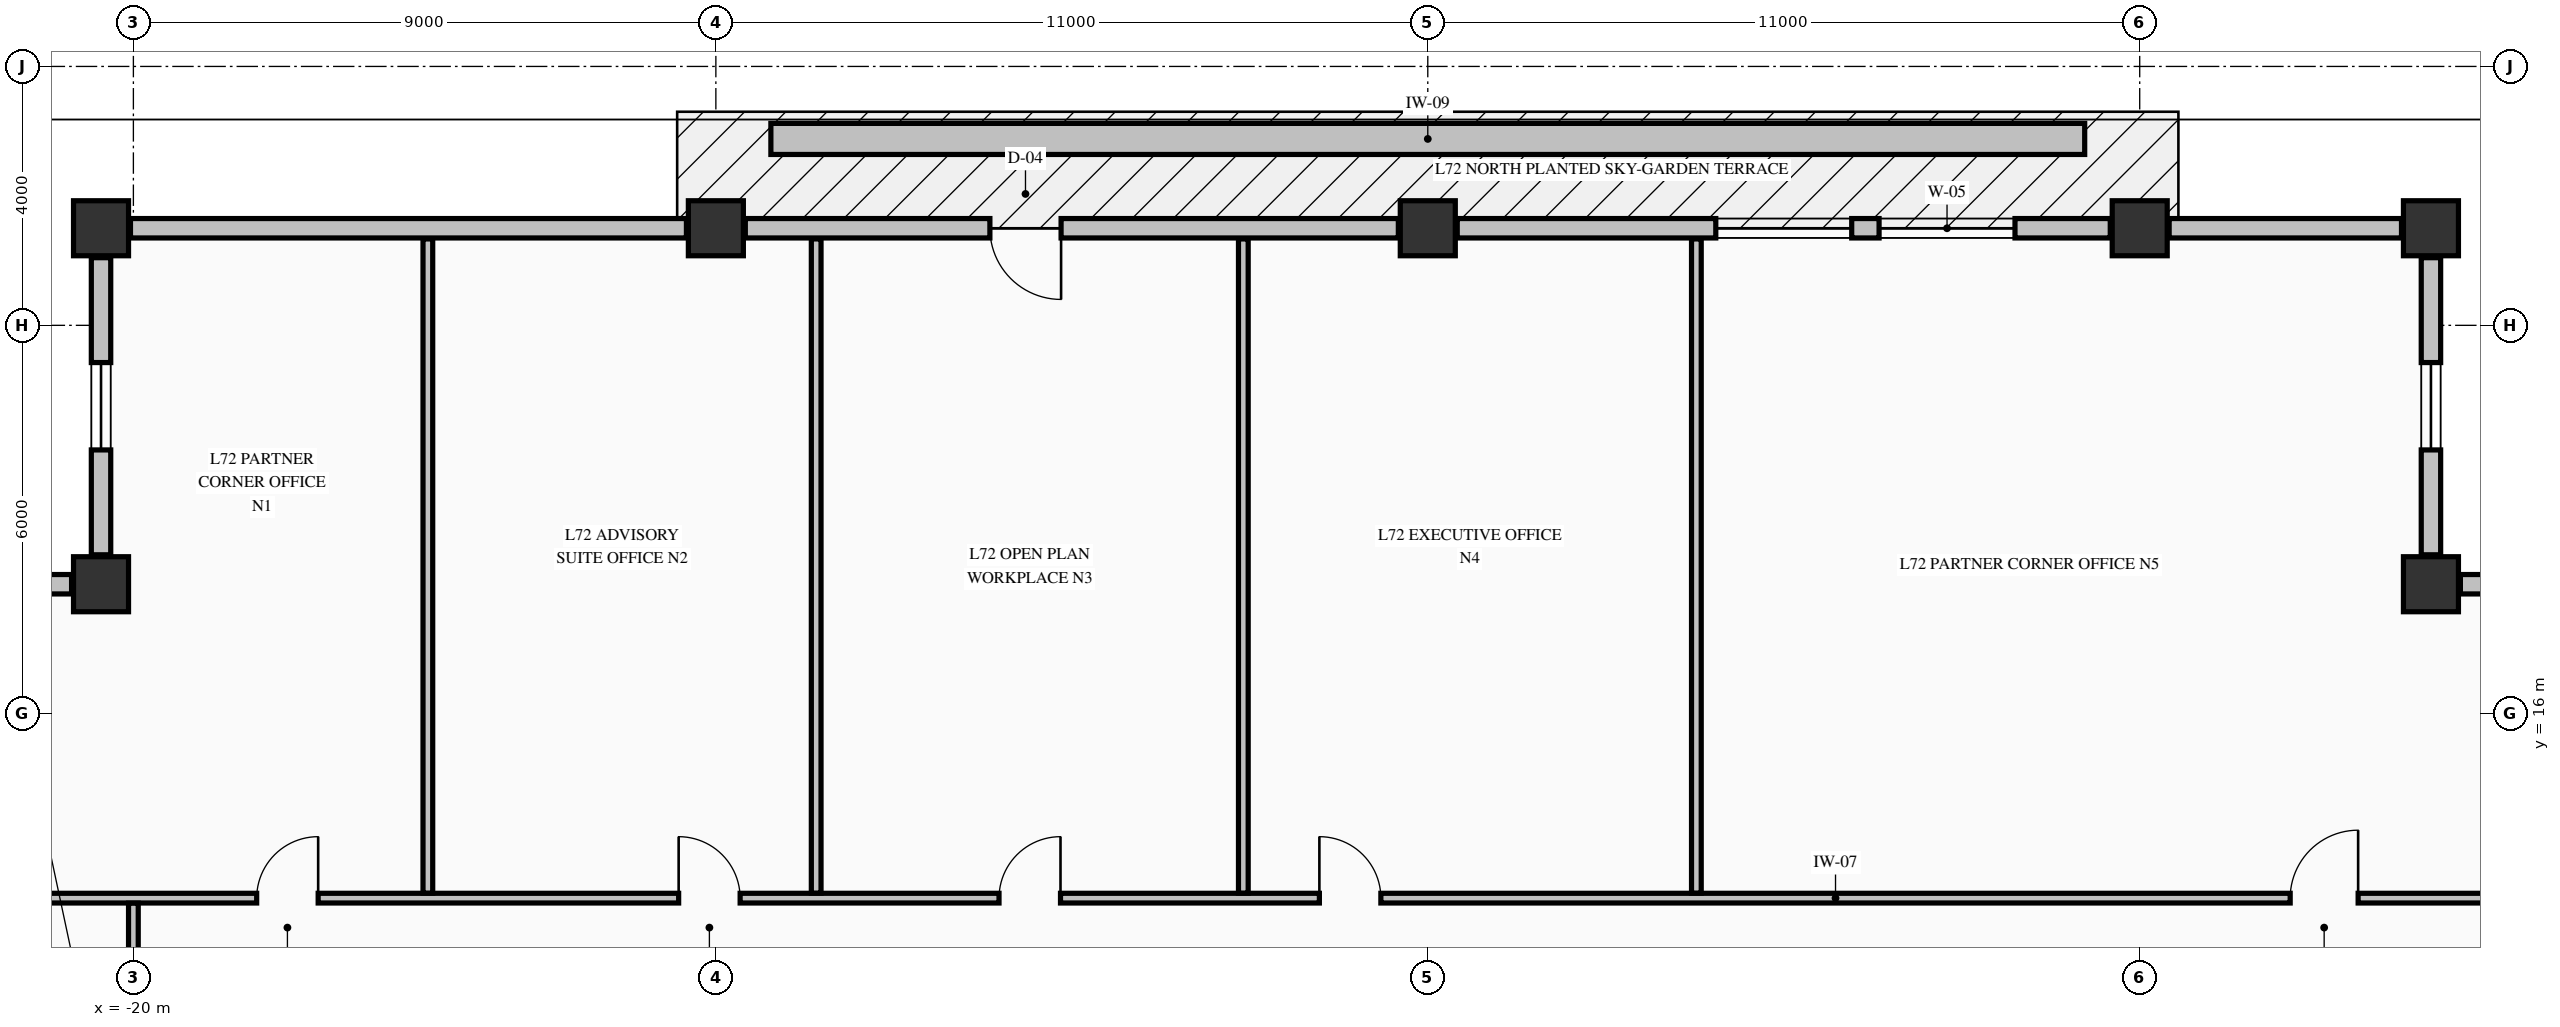
"""IFC4 building model, lengths in metres.
Left out: names, types, materials, properties, quantities, classifications, styles, units other than length and angle.
Written with IfcOpenShell. Run it as: python <this file> out.ifc"""

import sys

from ifc_helpers import new_model, si_unit, direction, frame, frame_2d, origin, origin_2d, place, context, subcontext, project, spatial, rectangle, extrude, element, fill, save


model = new_model("IFC4")
c1 = context("Model", 3, precision=1e-05, world=origin(), true_north=direction((0.0, 1.0)))
c2 = subcontext(c1, "Body", "Model", "MODEL_VIEW")
j1 = project(units=[si_unit("LENGTHUNIT", "METRE"), si_unit("PLANEANGLEUNIT", "RADIAN")], contexts=[c1])
p1 = place(None, origin())
s1 = spatial("IfcSite", under=j1, at=p1, CompositionType="ELEMENT")
p2 = place(p1, origin())
s2 = spatial("IfcBuilding", under=s1, at=p2, CompositionType="ELEMENT")
p3 = place(p2, frame((0.0, 0.0, 270.58)))
s3 = spatial("IfcBuildingStorey", under=s2, at=p3, CompositionType="ELEMENT", Elevation=270.58)
for number, where, z_axis, x_axis in (
    (1, (-20.5, 23.5, -0.325), (0.0, 0.0, 1.0), (1.0, 0.0, 0.0)),
    (2, (-11.0, 23.5, -0.325), (0.0, 0.0, 1.0), (1.0, 0.0, 0.0)),
    (3, (0.0, 23.5, -0.325), (0.0, 0.0, 1.0), (1.0, 0.0, 0.0)),
    (4, (11.0, 23.5, -0.325), (0.0, 0.0, 1.0), (1.0, 0.0, 0.0)),
    (5, (15.5, 23.5, -0.325), (0.0, 0.0, 1.0), (1.0, 0.0, 0.0)),
    (6, (15.5, 18.0, -0.325), (0.0, 0.0, 1.0), (1.0, 0.0, 0.0)),
    (7, (-20.5, 18.0, -0.325), (0.0, 0.0, 1.0), (1.0, 0.0, 0.0)),
):
    element("IfcColumn", number, at=place(p3, frame(where, z_axis=z_axis, x_axis=x_axis)), inside=s3, PredefinedType="COLUMN", context=c2, shape_type="SweptSolid", body=[
        extrude(rectangle(XDim=0.85, YDim=0.85, at=origin_2d()), origin(), (0.0, 0.0, 1.0), 3.815),
    ])
p4 = place(p3, frame((20.545, 18.0, 0.0), z_axis=(0.0, 0.0, 1.0), x_axis=(-1.0, 0.0, 0.0)))
e8 = element("IfcWall", 8, at=p4, inside=s3, PredefinedType="STANDARD", context=c2, shape_type="SweptSolid", body=[
    extrude(rectangle(XDim=4.59, YDim=0.3, at=frame_2d((2.295, 0.0))), origin(), (0.0, 0.0, 1.0), 2.882),
])
p5 = place(p4, frame((1.62, 0.0, 0.68)))
e9 = element("IfcOpeningElement", 9, at=p5, cuts=e8, PredefinedType="OPENING", context=c2, shape_type="SweptSolid", body=[
    extrude(rectangle(XDim=1.35, YDim=1.42, at=frame_2d((0.675, 0.71))), frame((0.0, 0.16, 0.0), z_axis=(0.0, -1.0, 0.0), x_axis=(1.0, 0.0, 0.0)), (0.0, 0.0, 1.0), 0.32),
])
p6 = place(p3, frame((15.5, 18.455, 0.0), z_axis=(0.0, 0.0, 1.0), x_axis=(0.0, 1.0, 0.0)))
e10 = element("IfcWall", 10, at=p6, inside=s3, PredefinedType="STANDARD", context=c2, shape_type="SweptSolid", body=[
    extrude(rectangle(XDim=4.59, YDim=0.3, at=frame_2d((2.295, 0.0))), origin(), (0.0, 0.0, 1.0), 2.882),
])
p7 = place(p6, frame((1.62, 0.0, 0.68)))
e11 = element("IfcOpeningElement", 11, at=p7, cuts=e10, PredefinedType="OPENING", context=c2, shape_type="SweptSolid", body=[
    extrude(rectangle(XDim=1.35, YDim=1.42, at=frame_2d((0.675, 0.71))), frame((0.0, 0.16, 0.0), z_axis=(0.0, -1.0, 0.0), x_axis=(1.0, 0.0, 0.0)), (0.0, 0.0, 1.0), 0.32),
])
p8 = place(p3, frame((-20.5, 23.045, 0.0), z_axis=(0.0, 0.0, 1.0), x_axis=(0.0, -1.0, 0.0)))
e12 = element("IfcWall", 12, at=p8, inside=s3, PredefinedType="STANDARD", context=c2, shape_type="SweptSolid", body=[
    extrude(rectangle(XDim=4.59, YDim=0.3, at=frame_2d((2.295, 0.0))), origin(), (0.0, 0.0, 1.0), 2.882),
])
p9 = place(p8, frame((1.62, 0.0, 0.68)))
e13 = element("IfcOpeningElement", 13, at=p9, cuts=e12, PredefinedType="OPENING", context=c2, shape_type="SweptSolid", body=[
    extrude(rectangle(XDim=1.35, YDim=1.42, at=frame_2d((0.675, 0.71))), frame((0.0, 0.16, 0.0), z_axis=(0.0, -1.0, 0.0), x_axis=(1.0, 0.0, 0.0)), (0.0, 0.0, 1.0), 0.32),
])
p10 = place(p3, frame((-20.955, 18.0, 0.0), z_axis=(0.0, 0.0, 1.0), x_axis=(-1.0, 0.0, 0.0)))
e14 = element("IfcWall", 14, at=p10, inside=s3, PredefinedType="STANDARD", context=c2, shape_type="SweptSolid", body=[
    extrude(rectangle(XDim=4.59, YDim=0.3, at=frame_2d((2.295, 0.0))), origin(), (0.0, 0.0, 1.0), 2.882),
])
p11 = place(p10, frame((1.62, 0.0, 0.68)))
e15 = element("IfcOpeningElement", 15, at=p11, cuts=e14, PredefinedType="OPENING", context=c2, shape_type="SweptSolid", body=[
    extrude(rectangle(XDim=1.35, YDim=1.42, at=frame_2d((0.675, 0.71))), frame((0.0, 0.16, 0.0), z_axis=(0.0, -1.0, 0.0), x_axis=(1.0, 0.0, 0.0)), (0.0, 0.0, 1.0), 0.32),
])
p12 = place(p3, frame((-11.455, 23.5, 0.0), z_axis=(0.0, 0.0, 1.0), x_axis=(-1.0, 0.0, 0.0)))
e16 = element("IfcWall", 16, at=p12, inside=s3, PredefinedType="STANDARD", context=c2, shape_type="SweptSolid", body=[
    extrude(rectangle(XDim=8.59, YDim=0.3, at=frame_2d((4.295, 0.0))), origin(), (0.0, 0.0, 1.0), 2.882),
])
p13 = place(p3, frame((-0.455, 23.5, 0.0), z_axis=(0.0, 0.0, 1.0), x_axis=(-1.0, 0.0, 0.0)))
e17 = element("IfcWall", 17, at=p13, inside=s3, PredefinedType="STANDARD", context=c2, shape_type="SweptSolid", body=[
    extrude(rectangle(XDim=10.09, YDim=0.3, at=frame_2d((5.045, 0.0))), origin(), (0.0, 0.0, 1.0), 2.882),
])
p14 = place(p13, frame((5.211, 0.0, 0.0)))
e18 = element("IfcOpeningElement", 18, at=p14, cuts=e17, PredefinedType="OPENING", context=c2, shape_type="SweptSolid", body=[
    extrude(rectangle(XDim=1.1, YDim=2.15, at=frame_2d((0.55, 1.075))), frame((0.0, 0.16, 0.0), z_axis=(0.0, -1.0, 0.0), x_axis=(1.0, 0.0, 0.0)), (0.0, 0.0, 1.0), 0.32),
])
p15 = place(p3, frame((10.545, 23.5, 0.0), z_axis=(0.0, 0.0, 1.0), x_axis=(-1.0, 0.0, 0.0)))
e19 = element("IfcWall", 19, at=p15, inside=s3, PredefinedType="STANDARD", context=c2, shape_type="SweptSolid", body=[
    extrude(rectangle(XDim=10.09, YDim=0.3, at=frame_2d((5.045, 0.0))), origin(), (0.0, 0.0, 1.0), 2.882),
])
p16 = place(p15, frame((1.472, 0.0, 0.7)))
e20 = element("IfcOpeningElement", 20, at=p16, cuts=e19, PredefinedType="OPENING", context=c2, shape_type="SweptSolid", body=[
    extrude(rectangle(XDim=2.1, YDim=1.5, at=frame_2d((1.05, 0.75))), frame((0.0, 0.16, 0.0), z_axis=(0.0, -1.0, 0.0), x_axis=(1.0, 0.0, 0.0)), (0.0, 0.0, 1.0), 0.32),
])
p17 = place(p15, frame((3.995, 0.0, 0.7)))
e21 = element("IfcOpeningElement", 21, at=p17, cuts=e19, PredefinedType="OPENING", context=c2, shape_type="SweptSolid", body=[
    extrude(rectangle(XDim=2.1, YDim=1.5, at=frame_2d((1.05, 0.75))), frame((0.0, 0.16, 0.0), z_axis=(0.0, -1.0, 0.0), x_axis=(1.0, 0.0, 0.0)), (0.0, 0.0, 1.0), 0.32),
])
p18 = place(p3, frame((15.045, 23.5, 0.0), z_axis=(0.0, 0.0, 1.0), x_axis=(-1.0, 0.0, 0.0)))
e22 = element("IfcWall", 22, at=p18, inside=s3, PredefinedType="STANDARD", context=c2, shape_type="SweptSolid", body=[
    extrude(rectangle(XDim=3.59, YDim=0.3, at=frame_2d((1.795, 0.0))), origin(), (0.0, 0.0, 1.0), 2.882),
])
p19 = place(p3, frame((-25.835, 13.15, 0.0), z_axis=(0.0, 0.0, 1.0), x_axis=(1.0, 0.0, 0.0)))
e23 = element("IfcWall", 23, at=p19, inside=s3, PredefinedType="PARTITIONING", context=c2, shape_type="SweptSolid", body=[
    extrude(rectangle(XDim=45.91, YDim=0.15, at=frame_2d((22.955, 0.0))), origin(), (0.0, 0.0, 1.0), 3.49),
])
p20 = place(p19, frame((7.74, 0.0, 0.0)))
e24 = element("IfcOpeningElement", 24, at=p20, cuts=e23, PredefinedType="OPENING", context=c2, shape_type="SweptSolid", body=[
    extrude(rectangle(XDim=0.95, YDim=2.15, at=frame_2d((0.475, 1.075))), frame((0.0, 0.085, 0.0), z_axis=(0.0, -1.0, 0.0), x_axis=(1.0, 0.0, 0.0)), (0.0, 0.0, 1.0), 0.17),
])
p21 = place(p19, frame((14.26, 0.0, 0.0)))
e25 = element("IfcOpeningElement", 25, at=p21, cuts=e23, PredefinedType="OPENING", context=c2, shape_type="SweptSolid", body=[
    extrude(rectangle(XDim=0.95, YDim=2.15, at=frame_2d((0.475, 1.075))), frame((0.0, 0.085, 0.0), z_axis=(0.0, -1.0, 0.0), x_axis=(1.0, 0.0, 0.0)), (0.0, 0.0, 1.0), 0.17),
])
p22 = place(p19, frame((19.21, 0.0, 0.0)))
e26 = element("IfcOpeningElement", 26, at=p22, cuts=e23, PredefinedType="OPENING", context=c2, shape_type="SweptSolid", body=[
    extrude(rectangle(XDim=0.95, YDim=2.15, at=frame_2d((0.475, 1.075))), frame((0.0, 0.085, 0.0), z_axis=(0.0, -1.0, 0.0), x_axis=(1.0, 0.0, 0.0)), (0.0, 0.0, 1.0), 0.17),
])
p23 = place(p19, frame((24.16, 0.0, 0.0)))
e27 = element("IfcOpeningElement", 27, at=p23, cuts=e23, PredefinedType="OPENING", context=c2, shape_type="SweptSolid", body=[
    extrude(rectangle(XDim=0.95, YDim=2.15, at=frame_2d((0.475, 1.075))), frame((0.0, 0.085, 0.0), z_axis=(0.0, -1.0, 0.0), x_axis=(1.0, 0.0, 0.0)), (0.0, 0.0, 1.0), 0.17),
])
p24 = place(p19, frame((39.16, 0.0, 0.0)))
e28 = element("IfcOpeningElement", 28, at=p24, cuts=e23, PredefinedType="OPENING", context=c2, shape_type="SweptSolid", body=[
    extrude(rectangle(XDim=1.05, YDim=2.15, at=frame_2d((0.525, 1.075))), frame((0.0, 0.085, 0.0), z_axis=(0.0, -1.0, 0.0), x_axis=(1.0, 0.0, 0.0)), (0.0, 0.0, 1.0), 0.17),
])
p25 = place(p3, frame((-20.0, 10.856, 0.0), z_axis=(0.0, 0.0, 1.0), x_axis=(0.0, 1.0, 0.0)))
e29 = element("IfcWall", 29, at=p25, inside=s3, PredefinedType="PARTITIONING", context=c2, shape_type="SweptSolid", body=[
    extrude(rectangle(XDim=2.216, YDim=0.15, at=frame_2d((1.108, 0.0))), origin(), (0.0, 0.0, 1.0), 3.49),
])
p26 = place(p25, frame((0.489, 0.0, 0.0)))
e30 = element("IfcOpeningElement", 30, at=p26, cuts=e29, PredefinedType="OPENING", context=c2, shape_type="SweptSolid", body=[
    extrude(rectangle(XDim=0.95, YDim=2.15, at=frame_2d((0.475, 1.075))), frame((0.0, 0.085, 0.0), z_axis=(0.0, -1.0, 0.0), x_axis=(1.0, 0.0, 0.0)), (0.0, 0.0, 1.0), 0.17),
])
for number, where, z_axis, x_axis in (
    (31, (-15.45, 13.228, 0.0), (0.0, 0.0, 1.0), (0.0, 1.0, 0.0)),
    (32, (-9.45, 13.228, 0.0), (0.0, 0.0, 1.0), (0.0, 1.0, 0.0)),
    (33, (-2.85, 13.228, 0.0), (0.0, 0.0, 1.0), (0.0, 1.0, 0.0)),
    (34, (4.15, 13.228, 0.0), (0.0, 0.0, 1.0), (0.0, 1.0, 0.0)),
):
    element("IfcWall", number, at=place(p3, frame(where, z_axis=z_axis, x_axis=x_axis)), inside=s3, PredefinedType="PARTITIONING", context=c2, shape_type="SweptSolid", body=[
        extrude(rectangle(XDim=10.107, YDim=0.15, at=frame_2d((5.053, 0.0))), origin(), (0.0, 0.0, 1.0), 3.49),
    ])
p27 = place(p3, frame((-10.15, 24.88, -0.04), z_axis=(0.0, 0.0, 1.0), x_axis=(1.0, 0.0, 0.0)))
e35 = element("IfcWall", 35, at=p27, inside=s3, PredefinedType="PARAPET", context=c2, shape_type="SweptSolid", body=[
    extrude(rectangle(XDim=20.3, YDim=0.48, at=frame_2d((10.15, 0.0))), origin(), (0.0, 0.0, 1.0), 0.52),
])
p28 = place(p7, origin())
e36 = element("IfcWindow", 36, at=p28, inside=s3, PartitioningType="SINGLE_PANEL", PredefinedType="WINDOW", context=c2, shape_type="SweptSolid", body=[
    extrude(rectangle(XDim=1.35, YDim=1.42, at=frame_2d((0.675, 0.71))), frame((0.0, 0.03, 0.0), z_axis=(0.0, -1.0, 0.0), x_axis=(1.0, 0.0, 0.0)), (0.0, 0.0, 1.0), 0.06),
])
fill(e11, e36)
p29 = place(p9, origin())
e37 = element("IfcWindow", 37, at=p29, inside=s3, PartitioningType="SINGLE_PANEL", PredefinedType="WINDOW", context=c2, shape_type="SweptSolid", body=[
    extrude(rectangle(XDim=1.35, YDim=1.42, at=frame_2d((0.675, 0.71))), frame((0.0, 0.03, 0.0), z_axis=(0.0, -1.0, 0.0), x_axis=(1.0, 0.0, 0.0)), (0.0, 0.0, 1.0), 0.06),
])
fill(e13, e37)
p30 = place(p14, origin())
e38 = element("IfcDoor", 38, at=p30, inside=s3, OperationType="SINGLE_SWING_LEFT", PredefinedType="DOOR", context=c2, shape_type="SweptSolid", body=[
    extrude(rectangle(XDim=1.1, YDim=2.15, at=frame_2d((0.55, 1.075))), frame((0.0, 0.025, 0.0), z_axis=(0.0, -1.0, 0.0), x_axis=(1.0, 0.0, 0.0)), (0.0, 0.0, 1.0), 0.05),
])
fill(e18, e38)
p31 = place(p16, origin())
e39 = element("IfcWindow", 39, at=p31, inside=s3, PartitioningType="SINGLE_PANEL", PredefinedType="WINDOW", context=c2, shape_type="SweptSolid", body=[
    extrude(rectangle(XDim=2.1, YDim=1.5, at=frame_2d((1.05, 0.75))), frame((0.0, 0.03, 0.0), z_axis=(0.0, -1.0, 0.0), x_axis=(1.0, 0.0, 0.0)), (0.0, 0.0, 1.0), 0.06),
])
fill(e20, e39)
p32 = place(p17, origin())
e40 = element("IfcWindow", 40, at=p32, inside=s3, PartitioningType="SINGLE_PANEL", PredefinedType="WINDOW", context=c2, shape_type="SweptSolid", body=[
    extrude(rectangle(XDim=2.1, YDim=1.5, at=frame_2d((1.05, 0.75))), frame((0.0, 0.03, 0.0), z_axis=(0.0, -1.0, 0.0), x_axis=(1.0, 0.0, 0.0)), (0.0, 0.0, 1.0), 0.06),
])
fill(e21, e40)
p33 = place(p20, origin())
e41 = element("IfcDoor", 41, at=p33, inside=s3, OperationType="SINGLE_SWING_RIGHT", PredefinedType="DOOR", context=c2, shape_type="SweptSolid", body=[
    extrude(rectangle(XDim=0.95, YDim=2.15, at=frame_2d((0.475, 1.075))), frame((0.0, 0.025, 0.0), z_axis=(0.0, -1.0, 0.0), x_axis=(1.0, 0.0, 0.0)), (0.0, 0.0, 1.0), 0.05),
])
fill(e24, e41)
p34 = place(p21, origin())
e42 = element("IfcDoor", 42, at=p34, inside=s3, OperationType="SINGLE_SWING_LEFT", PredefinedType="DOOR", context=c2, shape_type="SweptSolid", body=[
    extrude(rectangle(XDim=0.95, YDim=2.15, at=frame_2d((0.475, 1.075))), frame((0.0, 0.025, 0.0), z_axis=(0.0, -1.0, 0.0), x_axis=(1.0, 0.0, 0.0)), (0.0, 0.0, 1.0), 0.05),
])
fill(e25, e42)
p35 = place(p22, origin())
e43 = element("IfcDoor", 43, at=p35, inside=s3, OperationType="SINGLE_SWING_RIGHT", PredefinedType="DOOR", context=c2, shape_type="SweptSolid", body=[
    extrude(rectangle(XDim=0.95, YDim=2.15, at=frame_2d((0.475, 1.075))), frame((0.0, 0.025, 0.0), z_axis=(0.0, -1.0, 0.0), x_axis=(1.0, 0.0, 0.0)), (0.0, 0.0, 1.0), 0.05),
])
fill(e26, e43)
p36 = place(p23, origin())
e44 = element("IfcDoor", 44, at=p36, inside=s3, OperationType="SINGLE_SWING_LEFT", PredefinedType="DOOR", context=c2, shape_type="SweptSolid", body=[
    extrude(rectangle(XDim=0.95, YDim=2.15, at=frame_2d((0.475, 1.075))), frame((0.0, 0.025, 0.0), z_axis=(0.0, -1.0, 0.0), x_axis=(1.0, 0.0, 0.0)), (0.0, 0.0, 1.0), 0.05),
])
fill(e27, e44)
p37 = place(p24, origin())
e45 = element("IfcDoor", 45, at=p37, inside=s3, OperationType="SINGLE_SWING_RIGHT", PredefinedType="DOOR", context=c2, shape_type="SweptSolid", body=[
    extrude(rectangle(XDim=1.05, YDim=2.15, at=frame_2d((0.525, 1.075))), frame((0.0, 0.025, 0.0), z_axis=(0.0, -1.0, 0.0), x_axis=(1.0, 0.0, 0.0)), (0.0, 0.0, 1.0), 0.05),
])
fill(e28, e45)
save(model, sys.argv[1])
